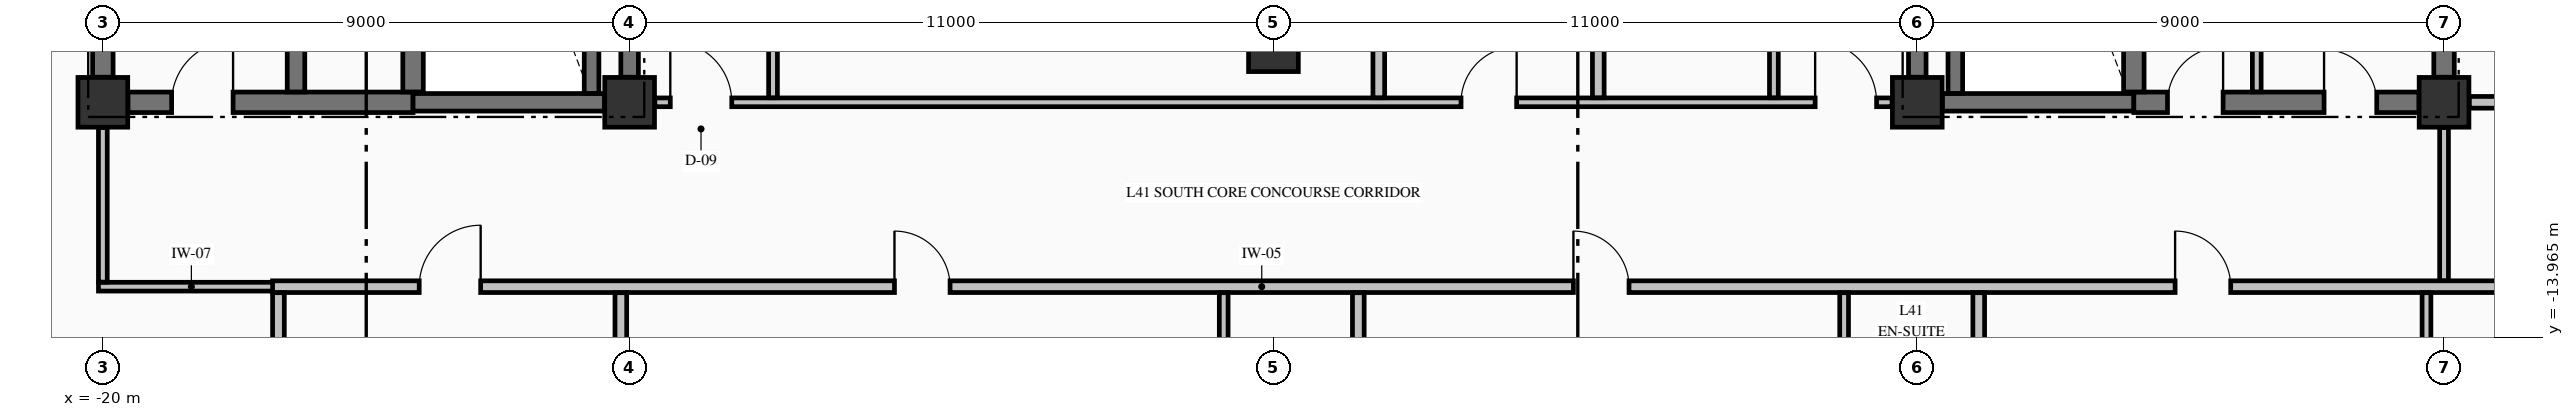
"""IFC4 building model, lengths in metres.
Left out: names, types, materials, properties, quantities, classifications, styles, units other than length and angle.
Written with IfcOpenShell. Run it as: python <this file> out.ifc"""

import sys

from ifc_helpers import new_model, si_unit, direction, frame, frame_2d, origin, origin_2d, place, context, subcontext, project, spatial, rectangle, extrude, element, fill, save


model = new_model("IFC4")
c1 = context("Model", 3, precision=1e-05, world=origin(), true_north=direction((0.0, 1.0)))
c2 = subcontext(c1, "Body", "Model", "MODEL_VIEW")
j1 = project(units=[si_unit("LENGTHUNIT", "METRE"), si_unit("PLANEANGLEUNIT", "RADIAN")], contexts=[c1])
p1 = place(None, origin())
s1 = spatial("IfcSite", under=j1, at=p1, CompositionType="ELEMENT")
p2 = place(p1, origin())
s2 = spatial("IfcBuilding", under=s1, at=p2, CompositionType="ELEMENT")
p3 = place(p2, frame((0.0, 0.0, 162.66)))
s3 = spatial("IfcBuildingStorey", under=s2, at=p3, CompositionType="ELEMENT", Elevation=162.66)
for number, where, z_axis, x_axis in (
    (1, (-20.0, -9.95, -0.25), (0.0, 0.0, 1.0), (1.0, 0.0, 0.0)),
    (2, (-11.0, -9.95, -0.25), (0.0, 0.0, 1.0), (1.0, 0.0, 0.0)),
    (3, (11.0, -9.95, -0.25), (0.0, 0.0, 1.0), (1.0, 0.0, 0.0)),
    (4, (20.0, -9.95, -0.25), (0.0, 0.0, 1.0), (1.0, 0.0, 0.0)),
    (5, (0.0, -9.0, -0.25), (0.0, 0.0, 1.0), (1.0, 0.0, 0.0)),
):
    element("IfcColumn", number, at=place(p3, frame(where, z_axis=z_axis, x_axis=x_axis)), inside=s3, PredefinedType="COLUMN", context=c2, shape_type="SweptSolid", body=[
        extrude(rectangle(XDim=0.85, YDim=0.85, at=origin_2d()), origin(), (0.0, 0.0, 1.0), 3.4),
    ])
p4 = place(p3, frame((-19.571, -9.95, 0.0), z_axis=(0.0, 0.0, 1.0), x_axis=(1.0, 0.0, 0.0)))
e6 = element("IfcWall", 6, at=p4, inside=s3, PredefinedType="SHEAR", context=c2, shape_type="SweptSolid", body=[
    extrude(rectangle(XDim=4.871, YDim=0.35, at=frame_2d((2.436, 0.0))), origin(), (0.0, 0.0, 1.0), 3.15),
])
p5 = place(p4, frame((0.746, 0.0, 0.0)))
e7 = element("IfcOpeningElement", 7, at=p5, cuts=e6, PredefinedType="OPENING", context=c2, shape_type="SweptSolid", body=[
    extrude(rectangle(XDim=1.05, YDim=2.15, at=frame_2d((0.525, 1.075))), frame((0.0, 0.185, 0.0), z_axis=(0.0, -1.0, 0.0), x_axis=(1.0, 0.0, 0.0)), (0.0, 0.0, 1.0), 0.37),
])
for number, where, z_axis, x_axis in (
    (8, (-14.7, -9.95, 0.0), (0.0, 0.0, 1.0), (1.0, 0.0, 0.0)),
    (9, (11.429, -9.95, 0.0), (0.0, 0.0, 1.0), (1.0, 0.0, 0.0)),
):
    element("IfcWall", number, at=place(p3, frame(where, z_axis=z_axis, x_axis=x_axis)), inside=s3, PredefinedType="SHEAR", context=c2, shape_type="SweptSolid", body=[
        extrude(rectangle(XDim=3.271, YDim=0.3, at=frame_2d((1.635, 0.0))), origin(), (0.0, 0.0, 1.0), 3.15),
    ])
p6 = place(p3, frame((14.7, -9.95, 0.0), z_axis=(0.0, 0.0, 1.0), x_axis=(1.0, 0.0, 0.0)))
e10 = element("IfcWall", 10, at=p6, inside=s3, PredefinedType="SHEAR", context=c2, shape_type="SweptSolid", body=[
    extrude(rectangle(XDim=4.871, YDim=0.35, at=frame_2d((2.436, 0.0))), origin(), (0.0, 0.0, 1.0), 3.15),
])
p7 = place(p6, frame((3.25, 0.0, 0.0)))
e11 = element("IfcOpeningElement", 11, at=p7, cuts=e10, PredefinedType="OPENING", context=c2, shape_type="SweptSolid", body=[
    extrude(rectangle(XDim=0.9, YDim=2.15, at=frame_2d((0.45, 1.075))), frame((0.0, 0.185, 0.0), z_axis=(0.0, -1.0, 0.0), x_axis=(1.0, 0.0, 0.0)), (0.0, 0.0, 1.0), 0.37),
])
p8 = place(p6, frame((0.575, 0.0, 0.0)))
e12 = element("IfcOpeningElement", 12, at=p8, cuts=e10, PredefinedType="OPENING", context=c2, shape_type="SweptSolid", body=[
    extrude(rectangle(XDim=0.95, YDim=2.15, at=frame_2d((0.475, 1.075))), frame((0.0, 0.185, 0.0), z_axis=(0.0, -1.0, 0.0), x_axis=(1.0, 0.0, 0.0)), (0.0, 0.0, 1.0), 0.37),
])
p9 = place(p3, frame((-20.075, -13.1, 0.0), z_axis=(0.0, 0.0, 1.0), x_axis=(1.0, 0.0, 0.0)))
e13 = element("IfcWall", 13, at=p9, inside=s3, PredefinedType="PARTITIONING", context=c2, shape_type="SweptSolid", body=[
    extrude(rectangle(XDim=3.175, YDim=0.15, at=frame_2d((1.587, 0.0))), origin(), (0.0, 0.0, 1.0), 3.15),
])
p10 = place(p3, frame((-17.1, -13.1, 0.0), z_axis=(0.0, 0.0, 1.0), x_axis=(1.0, 0.0, 0.0)))
e14 = element("IfcWall", 14, at=p10, inside=s3, PredefinedType="PARTITIONING", context=c2, shape_type="SweptSolid", body=[
    extrude(rectangle(XDim=39.2, YDim=0.2, at=frame_2d((19.6, 0.0))), origin(), (0.0, 0.0, 1.0), 3.15),
])
p11 = place(p10, frame((2.505, 0.0, 0.0)))
e15 = element("IfcOpeningElement", 15, at=p11, cuts=e14, PredefinedType="OPENING", context=c2, shape_type="SweptSolid", body=[
    extrude(rectangle(XDim=1.05, YDim=2.15, at=frame_2d((0.525, 1.075))), frame((0.0, 0.11, 0.0), z_axis=(0.0, -1.0, 0.0), x_axis=(1.0, 0.0, 0.0)), (0.0, 0.0, 1.0), 0.22),
])
p12 = place(p10, frame((10.625, 0.0, 0.0)))
e16 = element("IfcOpeningElement", 16, at=p12, cuts=e14, PredefinedType="OPENING", context=c2, shape_type="SweptSolid", body=[
    extrude(rectangle(XDim=0.95, YDim=2.15, at=frame_2d((0.475, 1.075))), frame((0.0, 0.11, 0.0), z_axis=(0.0, -1.0, 0.0), x_axis=(1.0, 0.0, 0.0)), (0.0, 0.0, 1.0), 0.22),
])
p13 = place(p10, frame((22.225, 0.0, 0.0)))
e17 = element("IfcOpeningElement", 17, at=p13, cuts=e14, PredefinedType="OPENING", context=c2, shape_type="SweptSolid", body=[
    extrude(rectangle(XDim=0.95, YDim=2.15, at=frame_2d((0.475, 1.075))), frame((0.0, 0.11, 0.0), z_axis=(0.0, -1.0, 0.0), x_axis=(1.0, 0.0, 0.0)), (0.0, 0.0, 1.0), 0.22),
])
p14 = place(p10, frame((32.505, 0.0, 0.0)))
e18 = element("IfcOpeningElement", 18, at=p14, cuts=e14, PredefinedType="OPENING", context=c2, shape_type="SweptSolid", body=[
    extrude(rectangle(XDim=0.95, YDim=2.15, at=frame_2d((0.475, 1.075))), frame((0.0, 0.11, 0.0), z_axis=(0.0, -1.0, 0.0), x_axis=(1.0, 0.0, 0.0)), (0.0, 0.0, 1.0), 0.22),
])
p15 = place(p3, frame((-10.569, -9.95, 0.0), z_axis=(0.0, 0.0, 1.0), x_axis=(1.0, 0.0, 0.0)))
e19 = element("IfcWall", 19, at=p15, inside=s3, PredefinedType="PARTITIONING", context=c2, shape_type="SweptSolid", body=[
    extrude(rectangle(XDim=21.138, YDim=0.15, at=frame_2d((10.569, 0.0))), origin(), (0.0, 0.0, 1.0), 3.15),
])
p16 = place(p15, frame((0.264, 0.0, 0.0)))
e20 = element("IfcOpeningElement", 20, at=p16, cuts=e19, PredefinedType="OPENING", context=c2, shape_type="SweptSolid", body=[
    extrude(rectangle(XDim=1.05, YDim=2.15, at=frame_2d((0.525, 1.075))), frame((0.0, 0.085, 0.0), z_axis=(0.0, -1.0, 0.0), x_axis=(1.0, 0.0, 0.0)), (0.0, 0.0, 1.0), 0.17),
])
p17 = place(p15, frame((19.824, 0.0, 0.0)))
e21 = element("IfcOpeningElement", 21, at=p17, cuts=e19, PredefinedType="OPENING", context=c2, shape_type="SweptSolid", body=[
    extrude(rectangle(XDim=1.05, YDim=2.15, at=frame_2d((0.525, 1.075))), frame((0.0, 0.085, 0.0), z_axis=(0.0, -1.0, 0.0), x_axis=(1.0, 0.0, 0.0)), (0.0, 0.0, 1.0), 0.17),
])
p18 = place(p15, frame((13.774, 0.0, 0.0)))
e22 = element("IfcOpeningElement", 22, at=p18, cuts=e19, PredefinedType="OPENING", context=c2, shape_type="SweptSolid", body=[
    extrude(rectangle(XDim=0.95, YDim=2.15, at=frame_2d((0.475, 1.075))), frame((0.0, 0.085, 0.0), z_axis=(0.0, -1.0, 0.0), x_axis=(1.0, 0.0, 0.0)), (0.0, 0.0, 1.0), 0.17),
])
p19 = place(p3, frame((20.431, -9.95, 0.0), z_axis=(0.0, 0.0, 1.0), x_axis=(1.0, 0.0, 0.0)))
e23 = element("IfcWall", 23, at=p19, inside=s3, PredefinedType="PARTITIONING", context=c2, shape_type="SweptSolid", body=[
    extrude(rectangle(XDim=6.404, YDim=0.2, at=frame_2d((3.202, 0.0))), origin(), (0.0, 0.0, 1.0), 3.15),
])
p20 = place(p3, frame((-20.0, -9.521, 0.0), z_axis=(0.0, 0.0, 1.0), x_axis=(0.0, 1.0, 0.0)))
e24 = element("IfcWall", 24, at=p20, inside=s3, PredefinedType="SHEAR", context=c2, shape_type="SweptSolid", body=[
    extrude(rectangle(XDim=9.092, YDim=0.35, at=frame_2d((4.546, 0.0))), origin(), (0.0, 0.0, 1.0), 3.15),
])
p21 = place(p3, frame((-16.7, -9.773, 0.0), z_axis=(0.0, 0.0, 1.0), x_axis=(0.0, 1.0, 0.0)))
e25 = element("IfcWall", 25, at=p21, inside=s3, PredefinedType="SHEAR", context=c2, shape_type="SweptSolid", body=[
    extrude(rectangle(XDim=9.371, YDim=0.3, at=frame_2d((4.686, 0.0))), origin(), (0.0, 0.0, 1.0), 3.15),
])
p22 = place(p3, frame((-14.7, -9.773, 0.0), z_axis=(0.0, 0.0, 1.0), x_axis=(0.0, 1.0, 0.0)))
e26 = element("IfcWall", 26, at=p22, inside=s3, PredefinedType="SHEAR", context=c2, shape_type="SweptSolid", body=[
    extrude(rectangle(XDim=9.371, YDim=0.35, at=frame_2d((4.686, 0.0))), origin(), (0.0, 0.0, 1.0), 3.15),
])
p23 = place(p3, frame((-11.65, -9.798, 0.0), z_axis=(0.0, 0.0, 1.0), x_axis=(0.0, 1.0, 0.0)))
e27 = element("IfcWall", 27, at=p23, inside=s3, PredefinedType="SOLIDWALL", context=c2, shape_type="SweptSolid", body=[
    extrude(rectangle(XDim=9.396, YDim=0.25, at=frame_2d((4.698, 0.0))), origin(), (0.0, 0.0, 1.0), 3.15),
])
for number, where, z_axis, x_axis in (
    (28, (-11.0, -9.521, 0.0), (0.0, 0.0, 1.0), (0.0, 1.0, 0.0)),
    (29, (11.0, -9.521, 0.0), (0.0, 0.0, 1.0), (0.0, 1.0, 0.0)),
):
    element("IfcWall", number, at=place(p3, frame(where, z_axis=z_axis, x_axis=x_axis)), inside=s3, PredefinedType="SHEAR", context=c2, shape_type="SweptSolid", body=[
        extrude(rectangle(XDim=9.092, YDim=0.3, at=frame_2d((4.546, 0.0))), origin(), (0.0, 0.0, 1.0), 3.15),
    ])
p24 = place(p3, frame((11.65, -9.798, 0.0), z_axis=(0.0, 0.0, 1.0), x_axis=(0.0, 1.0, 0.0)))
e30 = element("IfcWall", 30, at=p24, inside=s3, PredefinedType="SOLIDWALL", context=c2, shape_type="SweptSolid", body=[
    extrude(rectangle(XDim=9.396, YDim=0.25, at=frame_2d((4.698, 0.0))), origin(), (0.0, 0.0, 1.0), 3.15),
])
p25 = place(p3, frame((14.7, -9.773, 0.0), z_axis=(0.0, 0.0, 1.0), x_axis=(0.0, 1.0, 0.0)))
e31 = element("IfcWall", 31, at=p25, inside=s3, PredefinedType="SHEAR", context=c2, shape_type="SweptSolid", body=[
    extrude(rectangle(XDim=9.371, YDim=0.35, at=frame_2d((4.686, 0.0))), origin(), (0.0, 0.0, 1.0), 3.15),
])
p26 = place(p3, frame((20.0, -9.521, 0.0), z_axis=(0.0, 0.0, 1.0), x_axis=(0.0, 1.0, 0.0)))
e32 = element("IfcWall", 32, at=p26, inside=s3, PredefinedType="SHEAR", context=c2, shape_type="SweptSolid", body=[
    extrude(rectangle(XDim=9.092, YDim=0.35, at=frame_2d((4.546, 0.0))), origin(), (0.0, 0.0, 1.0), 3.15),
])
p27 = place(p3, frame((-20.0, -13.022, 0.0), z_axis=(0.0, 0.0, 1.0), x_axis=(0.0, 1.0, 0.0)))
e33 = element("IfcWall", 33, at=p27, inside=s3, PredefinedType="PARTITIONING", context=c2, shape_type="SweptSolid", body=[
    extrude(rectangle(XDim=2.641, YDim=0.15, at=frame_2d((1.32, 0.0))), origin(), (0.0, 0.0, 1.0), 2.342),
])
p28 = place(p3, frame((-17.0, -18.994, 0.0), z_axis=(0.0, 0.0, 1.0), x_axis=(0.0, 1.0, 0.0)))
e34 = element("IfcWall", 34, at=p28, inside=s3, PredefinedType="PARTITIONING", context=c2, shape_type="SweptSolid", body=[
    extrude(rectangle(XDim=5.791, YDim=0.2, at=frame_2d((2.896, 0.0))), origin(), (0.0, 0.0, 1.0), 3.15),
])
p29 = place(p3, frame((-11.15, -23.994, 0.0), z_axis=(0.0, 0.0, 1.0), x_axis=(0.0, 1.0, 0.0)))
e35 = element("IfcWall", 35, at=p29, inside=s3, PredefinedType="PARTITIONING", context=c2, shape_type="SweptSolid", body=[
    extrude(rectangle(XDim=10.791, YDim=0.2, at=frame_2d((5.396, 0.0))), origin(), (0.0, 0.0, 1.0), 2.342),
])
p30 = place(p3, frame((-8.55, -9.872, 0.0), z_axis=(0.0, 0.0, 1.0), x_axis=(0.0, 1.0, 0.0)))
e36 = element("IfcWall", 36, at=p30, inside=s3, PredefinedType="PARTITIONING", context=c2, shape_type="SweptSolid", body=[
    extrude(rectangle(XDim=11.969, YDim=0.15, at=frame_2d((5.984, 0.0))), origin(), (0.0, 0.0, 1.0), 3.15),
])
p31 = place(p30, frame((5.502, 0.0, 0.0)))
e37 = element("IfcOpeningElement", 37, at=p31, cuts=e36, PredefinedType="OPENING", context=c2, shape_type="SweptSolid", body=[
    extrude(rectangle(XDim=1.0, YDim=2.15, at=frame_2d((0.5, 1.075))), frame((0.0, 0.085, 0.0), z_axis=(0.0, -1.0, 0.0), x_axis=(1.0, 0.0, 0.0)), (0.0, 0.0, 1.0), 0.17),
])
p32 = place(p3, frame((-0.85, -15.272, 0.0), z_axis=(0.0, 0.0, 1.0), x_axis=(0.0, 1.0, 0.0)))
e38 = element("IfcWall", 38, at=p32, inside=s3, PredefinedType="PARTITIONING", context=c2, shape_type="SweptSolid", body=[
    extrude(rectangle(XDim=2.069, YDim=0.15, at=frame_2d((1.035, 0.0))), origin(), (0.0, 0.0, 1.0), 3.15),
])
p33 = place(p3, frame((1.45, -15.272, 0.0), z_axis=(0.0, 0.0, 1.0), x_axis=(0.0, 1.0, 0.0)))
e39 = element("IfcWall", 39, at=p33, inside=s3, PredefinedType="PARTITIONING", context=c2, shape_type="SweptSolid", body=[
    extrude(rectangle(XDim=2.069, YDim=0.2, at=frame_2d((1.035, 0.0))), origin(), (0.0, 0.0, 1.0), 3.15),
])
for number, where, z_axis, x_axis in (
    (40, (1.8, -9.872, 0.0), (0.0, 0.0, 1.0), (0.0, 1.0, 0.0)),
    (41, (5.55, -9.872, 0.0), (0.0, 0.0, 1.0), (0.0, 1.0, 0.0)),
):
    element("IfcWall", number, at=place(p3, frame(where, z_axis=z_axis, x_axis=x_axis)), inside=s3, PredefinedType="PARTITIONING", context=c2, shape_type="SweptSolid", body=[
        extrude(rectangle(XDim=4.569, YDim=0.2, at=frame_2d((2.285, 0.0))), origin(), (0.0, 0.0, 1.0), 3.15),
    ])
p34 = place(p3, frame((8.55, -9.872, 0.0), z_axis=(0.0, 0.0, 1.0), x_axis=(0.0, 1.0, 0.0)))
e42 = element("IfcWall", 42, at=p34, inside=s3, PredefinedType="PARTITIONING", context=c2, shape_type="SweptSolid", body=[
    extrude(rectangle(XDim=4.569, YDim=0.15, at=frame_2d((2.285, 0.0))), origin(), (0.0, 0.0, 1.0), 3.15),
])
p35 = place(p34, frame((1.847, 0.0, 0.0)))
e43 = element("IfcOpeningElement", 43, at=p35, cuts=e42, PredefinedType="OPENING", context=c2, shape_type="SweptSolid", body=[
    extrude(rectangle(XDim=0.95, YDim=2.15, at=frame_2d((0.475, 1.075))), frame((0.0, 0.085, 0.0), z_axis=(0.0, -1.0, 0.0), x_axis=(1.0, 0.0, 0.0)), (0.0, 0.0, 1.0), 0.17),
])
p36 = place(p3, frame((9.75, -15.972, 0.0), z_axis=(0.0, 0.0, 1.0), x_axis=(0.0, 1.0, 0.0)))
e44 = element("IfcWall", 44, at=p36, inside=s3, PredefinedType="PARTITIONING", context=c2, shape_type="SweptSolid", body=[
    extrude(rectangle(XDim=2.769, YDim=0.15, at=frame_2d((1.385, 0.0))), origin(), (0.0, 0.0, 1.0), 3.15),
])
p37 = place(p3, frame((12.05, -15.972, 0.0), z_axis=(0.0, 0.0, 1.0), x_axis=(0.0, 1.0, 0.0)))
e45 = element("IfcWall", 45, at=p37, inside=s3, PredefinedType="PARTITIONING", context=c2, shape_type="SweptSolid", body=[
    extrude(rectangle(XDim=2.769, YDim=0.2, at=frame_2d((1.385, 0.0))), origin(), (0.0, 0.0, 1.0), 3.15),
])
p38 = place(p3, frame((16.8, -9.772, 0.0), z_axis=(0.0, 0.0, 1.0), x_axis=(0.0, 1.0, 0.0)))
e46 = element("IfcWall", 46, at=p38, inside=s3, PredefinedType="PARTITIONING", context=c2, shape_type="SweptSolid", body=[
    extrude(rectangle(XDim=7.194, YDim=0.15, at=frame_2d((3.597, 0.0))), origin(), (0.0, 0.0, 1.0), 3.15),
])
p39 = place(p3, frame((19.7, -15.272, 0.0), z_axis=(0.0, 0.0, 1.0), x_axis=(0.0, 1.0, 0.0)))
e47 = element("IfcWall", 47, at=p39, inside=s3, PredefinedType="PARTITIONING", context=c2, shape_type="SweptSolid", body=[
    extrude(rectangle(XDim=2.069, YDim=0.15, at=frame_2d((1.035, 0.0))), origin(), (0.0, 0.0, 1.0), 2.342),
])
p40 = place(p3, frame((20.0, -12.997, 0.0), z_axis=(0.0, 0.0, 1.0), x_axis=(0.0, 1.0, 0.0)))
e48 = element("IfcWall", 48, at=p40, inside=s3, PredefinedType="PARTITIONING", context=c2, shape_type="SweptSolid", body=[
    extrude(rectangle(XDim=2.616, YDim=0.15, at=frame_2d((1.308, 0.0))), origin(), (0.0, 0.0, 1.0), 2.342),
])
p41 = place(p5, origin())
e49 = element("IfcDoor", 49, at=p41, inside=s3, OperationType="SINGLE_SWING_RIGHT", PredefinedType="DOOR", context=c2, shape_type="SweptSolid", body=[
    extrude(rectangle(XDim=1.05, YDim=2.15, at=frame_2d((0.525, 1.075))), frame((0.0, 0.025, 0.0), z_axis=(0.0, -1.0, 0.0), x_axis=(1.0, 0.0, 0.0)), (0.0, 0.0, 1.0), 0.05),
])
fill(e7, e49)
p42 = place(p7, origin())
e50 = element("IfcDoor", 50, at=p42, inside=s3, OperationType="SINGLE_SWING_LEFT", PredefinedType="DOOR", context=c2, shape_type="SweptSolid", body=[
    extrude(rectangle(XDim=0.9, YDim=2.15, at=frame_2d((0.45, 1.075))), frame((0.0, 0.025, 0.0), z_axis=(0.0, -1.0, 0.0), x_axis=(1.0, 0.0, 0.0)), (0.0, 0.0, 1.0), 0.05),
])
fill(e11, e50)
p43 = place(p8, origin())
e51 = element("IfcDoor", 51, at=p43, inside=s3, OperationType="SINGLE_SWING_RIGHT", PredefinedType="DOOR", context=c2, shape_type="SweptSolid", body=[
    extrude(rectangle(XDim=0.95, YDim=2.15, at=frame_2d((0.475, 1.075))), frame((0.0, 0.025, 0.0), z_axis=(0.0, -1.0, 0.0), x_axis=(1.0, 0.0, 0.0)), (0.0, 0.0, 1.0), 0.05),
])
fill(e12, e51)
p44 = place(p16, origin())
e52 = element("IfcDoor", 52, at=p44, inside=s3, OperationType="SINGLE_SWING_LEFT", PredefinedType="DOOR", context=c2, shape_type="SweptSolid", body=[
    extrude(rectangle(XDim=1.05, YDim=2.15, at=frame_2d((0.525, 1.075))), frame((0.0, 0.025, 0.0), z_axis=(0.0, -1.0, 0.0), x_axis=(1.0, 0.0, 0.0)), (0.0, 0.0, 1.0), 0.05),
])
fill(e20, e52)
p45 = place(p17, origin())
e53 = element("IfcDoor", 53, at=p45, inside=s3, OperationType="SINGLE_SWING_LEFT", PredefinedType="DOOR", context=c2, shape_type="SweptSolid", body=[
    extrude(rectangle(XDim=1.05, YDim=2.15, at=frame_2d((0.525, 1.075))), frame((0.0, 0.025, 0.0), z_axis=(0.0, -1.0, 0.0), x_axis=(1.0, 0.0, 0.0)), (0.0, 0.0, 1.0), 0.05),
])
fill(e21, e53)
p46 = place(p11, origin())
e54 = element("IfcDoor", 54, at=p46, inside=s3, OperationType="SINGLE_SWING_RIGHT", PredefinedType="DOOR", context=c2, shape_type="SweptSolid", body=[
    extrude(rectangle(XDim=1.05, YDim=2.15, at=frame_2d((0.525, 1.075))), frame((0.0, 0.025, 0.0), z_axis=(0.0, -1.0, 0.0), x_axis=(1.0, 0.0, 0.0)), (0.0, 0.0, 1.0), 0.05),
])
fill(e15, e54)
p47 = place(p12, origin())
e55 = element("IfcDoor", 55, at=p47, inside=s3, OperationType="SINGLE_SWING_LEFT", PredefinedType="DOOR", context=c2, shape_type="SweptSolid", body=[
    extrude(rectangle(XDim=0.95, YDim=2.15, at=frame_2d((0.475, 1.075))), frame((0.0, 0.025, 0.0), z_axis=(0.0, -1.0, 0.0), x_axis=(1.0, 0.0, 0.0)), (0.0, 0.0, 1.0), 0.05),
])
fill(e16, e55)
p48 = place(p13, origin())
e56 = element("IfcDoor", 56, at=p48, inside=s3, OperationType="SINGLE_SWING_LEFT", PredefinedType="DOOR", context=c2, shape_type="SweptSolid", body=[
    extrude(rectangle(XDim=0.95, YDim=2.15, at=frame_2d((0.475, 1.075))), frame((0.0, 0.025, 0.0), z_axis=(0.0, -1.0, 0.0), x_axis=(1.0, 0.0, 0.0)), (0.0, 0.0, 1.0), 0.05),
])
fill(e17, e56)
p49 = place(p14, origin())
e57 = element("IfcDoor", 57, at=p49, inside=s3, OperationType="SINGLE_SWING_LEFT", PredefinedType="DOOR", context=c2, shape_type="SweptSolid", body=[
    extrude(rectangle(XDim=0.95, YDim=2.15, at=frame_2d((0.475, 1.075))), frame((0.0, 0.025, 0.0), z_axis=(0.0, -1.0, 0.0), x_axis=(1.0, 0.0, 0.0)), (0.0, 0.0, 1.0), 0.05),
])
fill(e18, e57)
p50 = place(p18, origin())
e58 = element("IfcDoor", 58, at=p50, inside=s3, OperationType="SINGLE_SWING_RIGHT", PredefinedType="DOOR", context=c2, shape_type="SweptSolid", body=[
    extrude(rectangle(XDim=0.95, YDim=2.15, at=frame_2d((0.475, 1.075))), frame((0.0, 0.025, 0.0), z_axis=(0.0, -1.0, 0.0), x_axis=(1.0, 0.0, 0.0)), (0.0, 0.0, 1.0), 0.05),
])
fill(e22, e58)
save(model, sys.argv[1])
